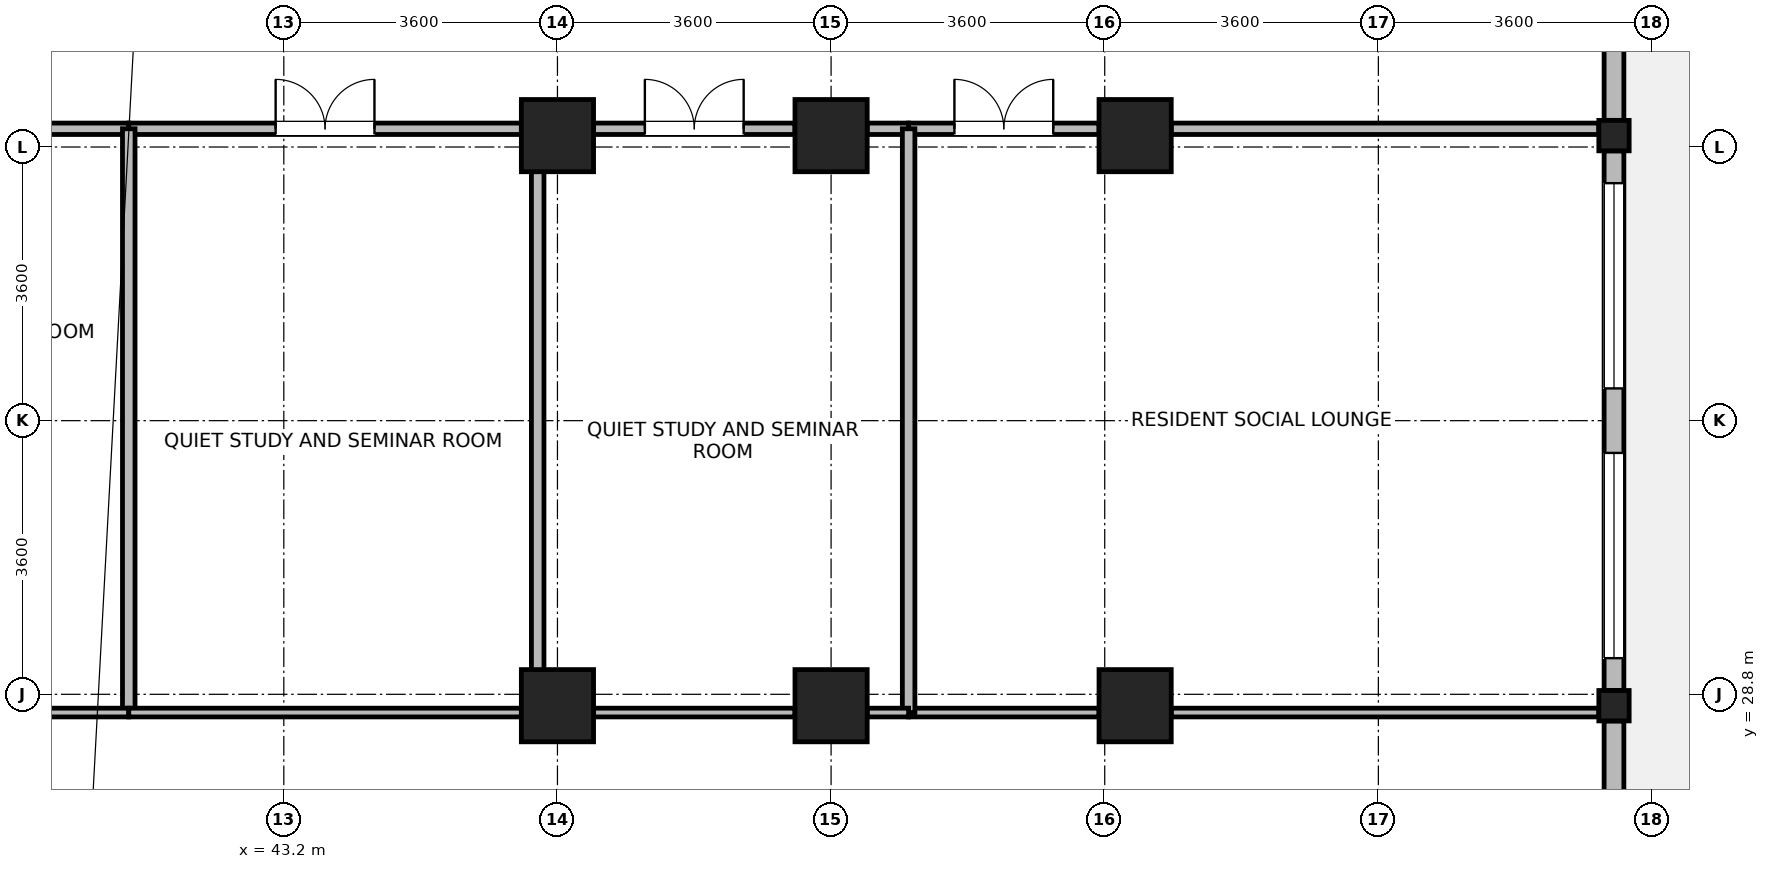
"""IFC4 building model, lengths in metres.
Left out: names, types, materials, properties, quantities, classifications, styles, units other than length and angle.
Written with IfcOpenShell. Run it as: python <this file> out.ifc"""

import sys

from ifc_helpers import new_model, si_unit, direction, frame, frame_2d, origin, origin_2d, place, context, subcontext, project, spatial, rectangle, i_section, extrude, source, transform, mapped, element, fill, save


model = new_model("IFC4")
c1 = context("Model", 3, precision=1e-05, world=origin(), true_north=direction((0.0, 1.0)))
c2 = subcontext(c1, "Body", "Model", "MODEL_VIEW")
j1 = project(units=[si_unit("LENGTHUNIT", "METRE"), si_unit("PLANEANGLEUNIT", "RADIAN")], contexts=[c1])
p1 = place(None, origin())
s1 = spatial("IfcSite", under=j1, at=p1, CompositionType="ELEMENT")
p2 = place(p1, origin())
s2 = spatial("IfcBuilding", under=s1, at=p2, CompositionType="ELEMENT")
p3 = place(p2, frame((0.0, 0.0, 197.2)))
s3 = spatial("IfcBuildingStorey", under=s2, at=p3, CompositionType="ELEMENT", Elevation=197.2)
m1 = source(origin(), c2, "Body", "SweptSolid", [
    extrude(rectangle(XDim=0.95, YDim=0.95, at=origin_2d()), origin(), (0.0, 0.0, 1.0), 4.6),
])
for number, where, z_axis, x_axis in (
    (1, (46.8, 28.65, 0.0), (0.0, 0.0, 1.0), (1.0, 0.0, 0.0)),
    (2, (46.8, 36.15, 0.0), (0.0, 0.0, 1.0), (1.0, 0.0, 0.0)),
    (3, (50.4, 28.65, 0.0), (0.0, 0.0, 1.0), (1.0, 0.0, 0.0)),
    (4, (50.4, 36.15, 0.0), (0.0, 0.0, 1.0), (1.0, 0.0, 0.0)),
    (5, (54.4, 28.65, 0.0), (0.0, 0.0, 1.0), (1.0, 0.0, 0.0)),
    (6, (54.4, 36.15, 0.0), (0.0, 0.0, 1.0), (1.0, 0.0, 0.0)),
):
    element("IfcColumn", number, at=place(p3, frame(where, z_axis=z_axis, x_axis=x_axis)), inside=s3, PredefinedType="COLUMN", context=c2, shape_type="MappedRepresentation", body=[
        mapped(m1, transform((0.0, 0.0, 0.0), x_axis=(1.0, 0.0, 0.0), y_axis=(0.0, 1.0, 0.0), z_axis=(0.0, 0.0, 1.0), scale=1.0)),
    ])
m2 = source(origin(), c2, "Body", "SweptSolid", [
    extrude(i_section(OverallWidth=0.399, OverallDepth=0.4, WebThickness=0.017, FlangeThickness=0.023, FilletRadius=0.015, at=origin_2d()), origin(), (0.0, 0.0, 1.0), 4.6),
])
for number, where, z_axis, x_axis in (
    (7, (60.7, 28.65, 0.0), (0.0, 0.0, 1.0), (1.0, 0.0, 0.0)),
    (8, (60.7, 36.15, 0.0), (0.0, 0.0, 1.0), (1.0, 0.0, 0.0)),
):
    element("IfcColumn", number, at=place(p3, frame(where, z_axis=z_axis, x_axis=x_axis)), inside=s3, PredefinedType="COLUMN", context=c2, shape_type="MappedRepresentation", body=[
        mapped(m2, transform((0.0, 0.0, 0.0), x_axis=(1.0, 0.0, 0.0), y_axis=(0.0, 1.0, 0.0), z_axis=(0.0, 0.0, 1.0), scale=1.0)),
    ])
p4 = place(p3, frame((60.7, 28.449, 0.0), z_axis=(0.0, 0.0, 1.0), x_axis=(0.0, -1.0, 0.0)))
e9 = element("IfcWall", 9, at=p4, inside=s3, PredefinedType="STANDARD", context=c2, shape_type="SweptSolid", body=[
    extrude(rectangle(XDim=6.648, YDim=0.26, at=frame_2d((3.324, 0.0))), origin(), (0.0, 0.0, 1.0), 3.9),
])
p5 = place(p4, frame((3.636, 0.0, 0.85)))
e10 = element("IfcOpeningElement", 10, at=p5, cuts=e9, PredefinedType="OPENING", context=c2, shape_type="SweptSolid", body=[
    extrude(rectangle(XDim=2.7, YDim=2.05, at=frame_2d((1.35, 1.025))), frame((0.0, 0.14, 0.0), z_axis=(0.0, -1.0, 0.0), x_axis=(1.0, 0.0, 0.0)), (0.0, 0.0, 1.0), 0.28),
])
p6 = place(p4, frame((2.317, 0.0, 0.85)))
e11 = element("IfcOpeningElement", 11, at=p6, cuts=e9, PredefinedType="OPENING", context=c2, shape_type="SweptSolid", body=[
    extrude(rectangle(XDim=0.95, YDim=1.75, at=frame_2d((0.475, 0.875))), frame((0.0, 0.14, 0.0), z_axis=(0.0, -1.0, 0.0), x_axis=(1.0, 0.0, 0.0)), (0.0, 0.0, 1.0), 0.28),
])
p7 = place(p3, frame((60.7, 35.949, 0.0), z_axis=(0.0, 0.0, 1.0), x_axis=(0.0, -1.0, 0.0)))
e12 = element("IfcWall", 12, at=p7, inside=s3, PredefinedType="STANDARD", context=c2, shape_type="SweptSolid", body=[
    extrude(rectangle(XDim=7.098, YDim=0.26, at=frame_2d((3.549, 0.0))), origin(), (0.0, 0.0, 1.0), 3.9),
])
p8 = place(p7, frame((0.425, 0.0, 0.85)))
e13 = element("IfcOpeningElement", 13, at=p8, cuts=e12, PredefinedType="OPENING", context=c2, shape_type="SweptSolid", body=[
    extrude(rectangle(XDim=2.7, YDim=2.05, at=frame_2d((1.35, 1.025))), frame((0.0, 0.14, 0.0), z_axis=(0.0, -1.0, 0.0), x_axis=(1.0, 0.0, 0.0)), (0.0, 0.0, 1.0), 0.28),
])
p9 = place(p7, frame((3.973, 0.0, 0.85)))
e14 = element("IfcOpeningElement", 14, at=p9, cuts=e12, PredefinedType="OPENING", context=c2, shape_type="SweptSolid", body=[
    extrude(rectangle(XDim=2.7, YDim=2.05, at=frame_2d((1.35, 1.025))), frame((0.0, 0.14, 0.0), z_axis=(0.0, -1.0, 0.0), x_axis=(1.0, 0.0, 0.0)), (0.0, 0.0, 1.0), 0.28),
])
p10 = place(p3, frame((60.7, 43.33, 0.0), z_axis=(0.0, 0.0, 1.0), x_axis=(0.0, -1.0, 0.0)))
e15 = element("IfcWall", 15, at=p10, inside=s3, PredefinedType="STANDARD", context=c2, shape_type="SweptSolid", body=[
    extrude(rectangle(XDim=6.979, YDim=0.26, at=frame_2d((3.49, 0.0))), origin(), (0.0, 0.0, 1.0), 4.35),
])
p11 = place(p10, frame((0.395, 0.0, 0.85)))
e16 = element("IfcOpeningElement", 16, at=p11, cuts=e15, PredefinedType="OPENING", context=c2, shape_type="SweptSolid", body=[
    extrude(rectangle(XDim=2.7, YDim=2.05, at=frame_2d((1.35, 1.025))), frame((0.0, 0.14, 0.0), z_axis=(0.0, -1.0, 0.0), x_axis=(1.0, 0.0, 0.0)), (0.0, 0.0, 1.0), 0.28),
])
p12 = place(p10, frame((3.573, 0.0, 0.85)))
e17 = element("IfcOpeningElement", 17, at=p12, cuts=e15, PredefinedType="OPENING", context=c2, shape_type="SweptSolid", body=[
    extrude(rectangle(XDim=0.95, YDim=1.75, at=frame_2d((0.475, 0.875))), frame((0.0, 0.14, 0.0), z_axis=(0.0, -1.0, 0.0), x_axis=(1.0, 0.0, 0.0)), (0.0, 0.0, 1.0), 0.28),
])
p13 = place(p3, frame((51.42, 36.24, 0.0), z_axis=(0.0, 0.0, 1.0), x_axis=(1.0, 0.0, 0.0)))
e18 = element("IfcWall", 18, at=p13, inside=s3, PredefinedType="PARTITIONING", context=c2, shape_type="SweptSolid", body=[
    extrude(rectangle(XDim=2.505, YDim=0.15, at=frame_2d((1.252, 0.0))), origin(), (0.0, 0.0, 1.0), 3.75),
])
p14 = place(p13, frame((0.603, 0.0, 0.0)))
e19 = element("IfcOpeningElement", 19, at=p14, cuts=e18, PredefinedType="OPENING", context=c2, shape_type="SweptSolid", body=[
    extrude(rectangle(XDim=1.3, YDim=2.12, at=frame_2d((0.65, 1.06))), frame((0.0, 0.085, 0.0), z_axis=(0.0, -1.0, 0.0), x_axis=(1.0, 0.0, 0.0)), (0.0, 0.0, 1.0), 0.17),
])
p15 = place(p3, frame((54.875, 36.24, 0.0), z_axis=(0.0, 0.0, 1.0), x_axis=(1.0, 0.0, 0.0)))
e20 = element("IfcWall", 20, at=p15, inside=s3, PredefinedType="PARTITIONING", context=c2, shape_type="SweptSolid", body=[
    extrude(rectangle(XDim=5.625, YDim=0.15, at=frame_2d((2.813, 0.0))), origin(), (0.0, 0.0, 1.0), 3.75),
])
p16 = place(p3, frame((36.475, 36.24, 0.0), z_axis=(0.0, 0.0, 1.0), x_axis=(1.0, 0.0, 0.0)))
e21 = element("IfcWall", 21, at=p16, inside=s3, PredefinedType="PARTITIONING", context=c2, shape_type="SweptSolid", body=[
    extrude(rectangle(XDim=4.685, YDim=0.15, at=frame_2d((2.342, 0.0))), origin(), (0.0, 0.0, 1.0), 3.75),
])
p17 = place(p3, frame((41.16, 36.24, 0.0), z_axis=(0.0, 0.0, 1.0), x_axis=(1.0, 0.0, 0.0)))
e22 = element("IfcWall", 22, at=p17, inside=s3, PredefinedType="PARTITIONING", context=c2, shape_type="SweptSolid", body=[
    extrude(rectangle(XDim=5.165, YDim=0.15, at=frame_2d((2.583, 0.0))), origin(), (0.0, 0.0, 1.0), 3.75),
])
p18 = place(p17, frame((1.933, 0.0, 0.0)))
e23 = element("IfcOpeningElement", 23, at=p18, cuts=e22, PredefinedType="OPENING", context=c2, shape_type="SweptSolid", body=[
    extrude(rectangle(XDim=1.3, YDim=2.12, at=frame_2d((0.65, 1.06))), frame((0.0, 0.085, 0.0), z_axis=(0.0, -1.0, 0.0), x_axis=(1.0, 0.0, 0.0)), (0.0, 0.0, 1.0), 0.17),
])
p19 = place(p3, frame((47.275, 36.24, 0.0), z_axis=(0.0, 0.0, 1.0), x_axis=(1.0, 0.0, 0.0)))
e24 = element("IfcWall", 24, at=p19, inside=s3, PredefinedType="PARTITIONING", context=c2, shape_type="SweptSolid", body=[
    extrude(rectangle(XDim=2.65, YDim=0.15, at=frame_2d((1.325, 0.0))), origin(), (0.0, 0.0, 1.0), 3.75),
])
p20 = place(p19, frame((0.675, 0.0, 0.0)))
e25 = element("IfcOpeningElement", 25, at=p20, cuts=e24, PredefinedType="OPENING", context=c2, shape_type="SweptSolid", body=[
    extrude(rectangle(XDim=1.3, YDim=2.12, at=frame_2d((0.65, 1.06))), frame((0.0, 0.085, 0.0), z_axis=(0.0, -1.0, 0.0), x_axis=(1.0, 0.0, 0.0)), (0.0, 0.0, 1.0), 0.17),
])
p21 = place(p3, frame((50.875, 36.24, 0.0), z_axis=(0.0, 0.0, 1.0), x_axis=(1.0, 0.0, 0.0)))
e26 = element("IfcWall", 26, at=p21, inside=s3, PredefinedType="PARTITIONING", context=c2, shape_type="SweptSolid", body=[
    extrude(rectangle(XDim=0.545, YDim=0.15, at=frame_2d((0.272, 0.0))), origin(), (0.0, 0.0, 1.0), 3.75),
])
p22 = place(p3, frame((51.42, 28.56, 0.0), z_axis=(0.0, 0.0, 1.0), x_axis=(1.0, 0.0, 0.0)))
e27 = element("IfcWall", 27, at=p22, inside=s3, PredefinedType="PARTITIONING", context=c2, shape_type="SweptSolid", body=[
    extrude(rectangle(XDim=2.505, YDim=0.115, at=frame_2d((1.252, 0.0))), origin(), (0.0, 0.0, 1.0), 3.75),
])
p23 = place(p3, frame((54.875, 28.56, 0.0), z_axis=(0.0, 0.0, 1.0), x_axis=(1.0, 0.0, 0.0)))
e28 = element("IfcWall", 28, at=p23, inside=s3, PredefinedType="PARTITIONING", context=c2, shape_type="SweptSolid", body=[
    extrude(rectangle(XDim=5.625, YDim=0.115, at=frame_2d((2.813, 0.0))), origin(), (0.0, 0.0, 1.0), 3.75),
])
for number, where, z_axis, x_axis in (
    (29, (41.16, 28.56, 0.0), (0.0, 0.0, 1.0), (0.0, 1.0, 0.0)),
    (30, (46.54, 28.56, 0.0), (0.0, 0.0, 1.0), (0.0, 1.0, 0.0)),
    (31, (51.42, 28.56, 0.0), (0.0, 0.0, 1.0), (0.0, 1.0, 0.0)),
):
    element("IfcWall", number, at=place(p3, frame(where, z_axis=z_axis, x_axis=x_axis)), inside=s3, PredefinedType="PARTITIONING", context=c2, shape_type="SweptSolid", body=[
        extrude(rectangle(XDim=7.68, YDim=0.165, at=frame_2d((3.84, 0.0))), origin(), (0.0, 0.0, 1.0), 4.35),
    ])
p24 = place(p3, frame((36.475, 28.56, 0.0), z_axis=(0.0, 0.0, 1.0), x_axis=(1.0, 0.0, 0.0)))
e32 = element("IfcWall", 32, at=p24, inside=s3, PredefinedType="PARTITIONING", context=c2, shape_type="SweptSolid", body=[
    extrude(rectangle(XDim=4.685, YDim=0.115, at=frame_2d((2.342, 0.0))), origin(), (0.0, 0.0, 1.0), 3.75),
])
p25 = place(p3, frame((41.16, 28.56, 0.0), z_axis=(0.0, 0.0, 1.0), x_axis=(1.0, 0.0, 0.0)))
e33 = element("IfcWall", 33, at=p25, inside=s3, PredefinedType="PARTITIONING", context=c2, shape_type="SweptSolid", body=[
    extrude(rectangle(XDim=5.165, YDim=0.115, at=frame_2d((2.583, 0.0))), origin(), (0.0, 0.0, 1.0), 3.75),
])
p26 = place(p3, frame((47.275, 28.56, 0.0), z_axis=(0.0, 0.0, 1.0), x_axis=(1.0, 0.0, 0.0)))
e34 = element("IfcWall", 34, at=p26, inside=s3, PredefinedType="PARTITIONING", context=c2, shape_type="SweptSolid", body=[
    extrude(rectangle(XDim=2.65, YDim=0.115, at=frame_2d((1.325, 0.0))), origin(), (0.0, 0.0, 1.0), 3.75),
])
p27 = place(p3, frame((50.875, 28.56, 0.0), z_axis=(0.0, 0.0, 1.0), x_axis=(1.0, 0.0, 0.0)))
e35 = element("IfcWall", 35, at=p27, inside=s3, PredefinedType="PARTITIONING", context=c2, shape_type="SweptSolid", body=[
    extrude(rectangle(XDim=0.545, YDim=0.115, at=frame_2d((0.272, 0.0))), origin(), (0.0, 0.0, 1.0), 3.75),
])
p28 = place(p8, origin())
e36 = element("IfcWindow", 36, at=p28, inside=s3, PartitioningType="SINGLE_PANEL", PredefinedType="WINDOW", context=c2, shape_type="SweptSolid", body=[
    extrude(rectangle(XDim=2.7, YDim=2.05, at=frame_2d((1.35, 1.025))), frame((0.0, 0.03, 0.0), z_axis=(0.0, -1.0, 0.0), x_axis=(1.0, 0.0, 0.0)), (0.0, 0.0, 1.0), 0.06),
])
fill(e13, e36)
p29 = place(p9, origin())
e37 = element("IfcWindow", 37, at=p29, inside=s3, PartitioningType="SINGLE_PANEL", PredefinedType="WINDOW", context=c2, shape_type="SweptSolid", body=[
    extrude(rectangle(XDim=2.7, YDim=2.05, at=frame_2d((1.35, 1.025))), frame((0.0, 0.03, 0.0), z_axis=(0.0, -1.0, 0.0), x_axis=(1.0, 0.0, 0.0)), (0.0, 0.0, 1.0), 0.06),
])
fill(e14, e37)
p30 = place(p14, origin())
e38 = element("IfcDoor", 38, at=p30, inside=s3, OperationType="DOUBLE_DOOR_SINGLE_SWING", PredefinedType="DOOR", context=c2, shape_type="SweptSolid", body=[
    extrude(rectangle(XDim=1.3, YDim=2.12, at=frame_2d((0.65, 1.06))), frame((0.0, 0.025, 0.0), z_axis=(0.0, -1.0, 0.0), x_axis=(1.0, 0.0, 0.0)), (0.0, 0.0, 1.0), 0.05),
])
fill(e19, e38)
p31 = place(p18, origin())
e39 = element("IfcDoor", 39, at=p31, inside=s3, OperationType="DOUBLE_DOOR_SINGLE_SWING", PredefinedType="DOOR", context=c2, shape_type="SweptSolid", body=[
    extrude(rectangle(XDim=1.3, YDim=2.12, at=frame_2d((0.65, 1.06))), frame((0.0, 0.025, 0.0), z_axis=(0.0, -1.0, 0.0), x_axis=(1.0, 0.0, 0.0)), (0.0, 0.0, 1.0), 0.05),
])
fill(e23, e39)
p32 = place(p20, origin())
e40 = element("IfcDoor", 40, at=p32, inside=s3, OperationType="DOUBLE_DOOR_SINGLE_SWING", PredefinedType="DOOR", context=c2, shape_type="SweptSolid", body=[
    extrude(rectangle(XDim=1.3, YDim=2.12, at=frame_2d((0.65, 1.06))), frame((0.0, 0.025, 0.0), z_axis=(0.0, -1.0, 0.0), x_axis=(1.0, 0.0, 0.0)), (0.0, 0.0, 1.0), 0.05),
])
fill(e25, e40)
save(model, sys.argv[1])
